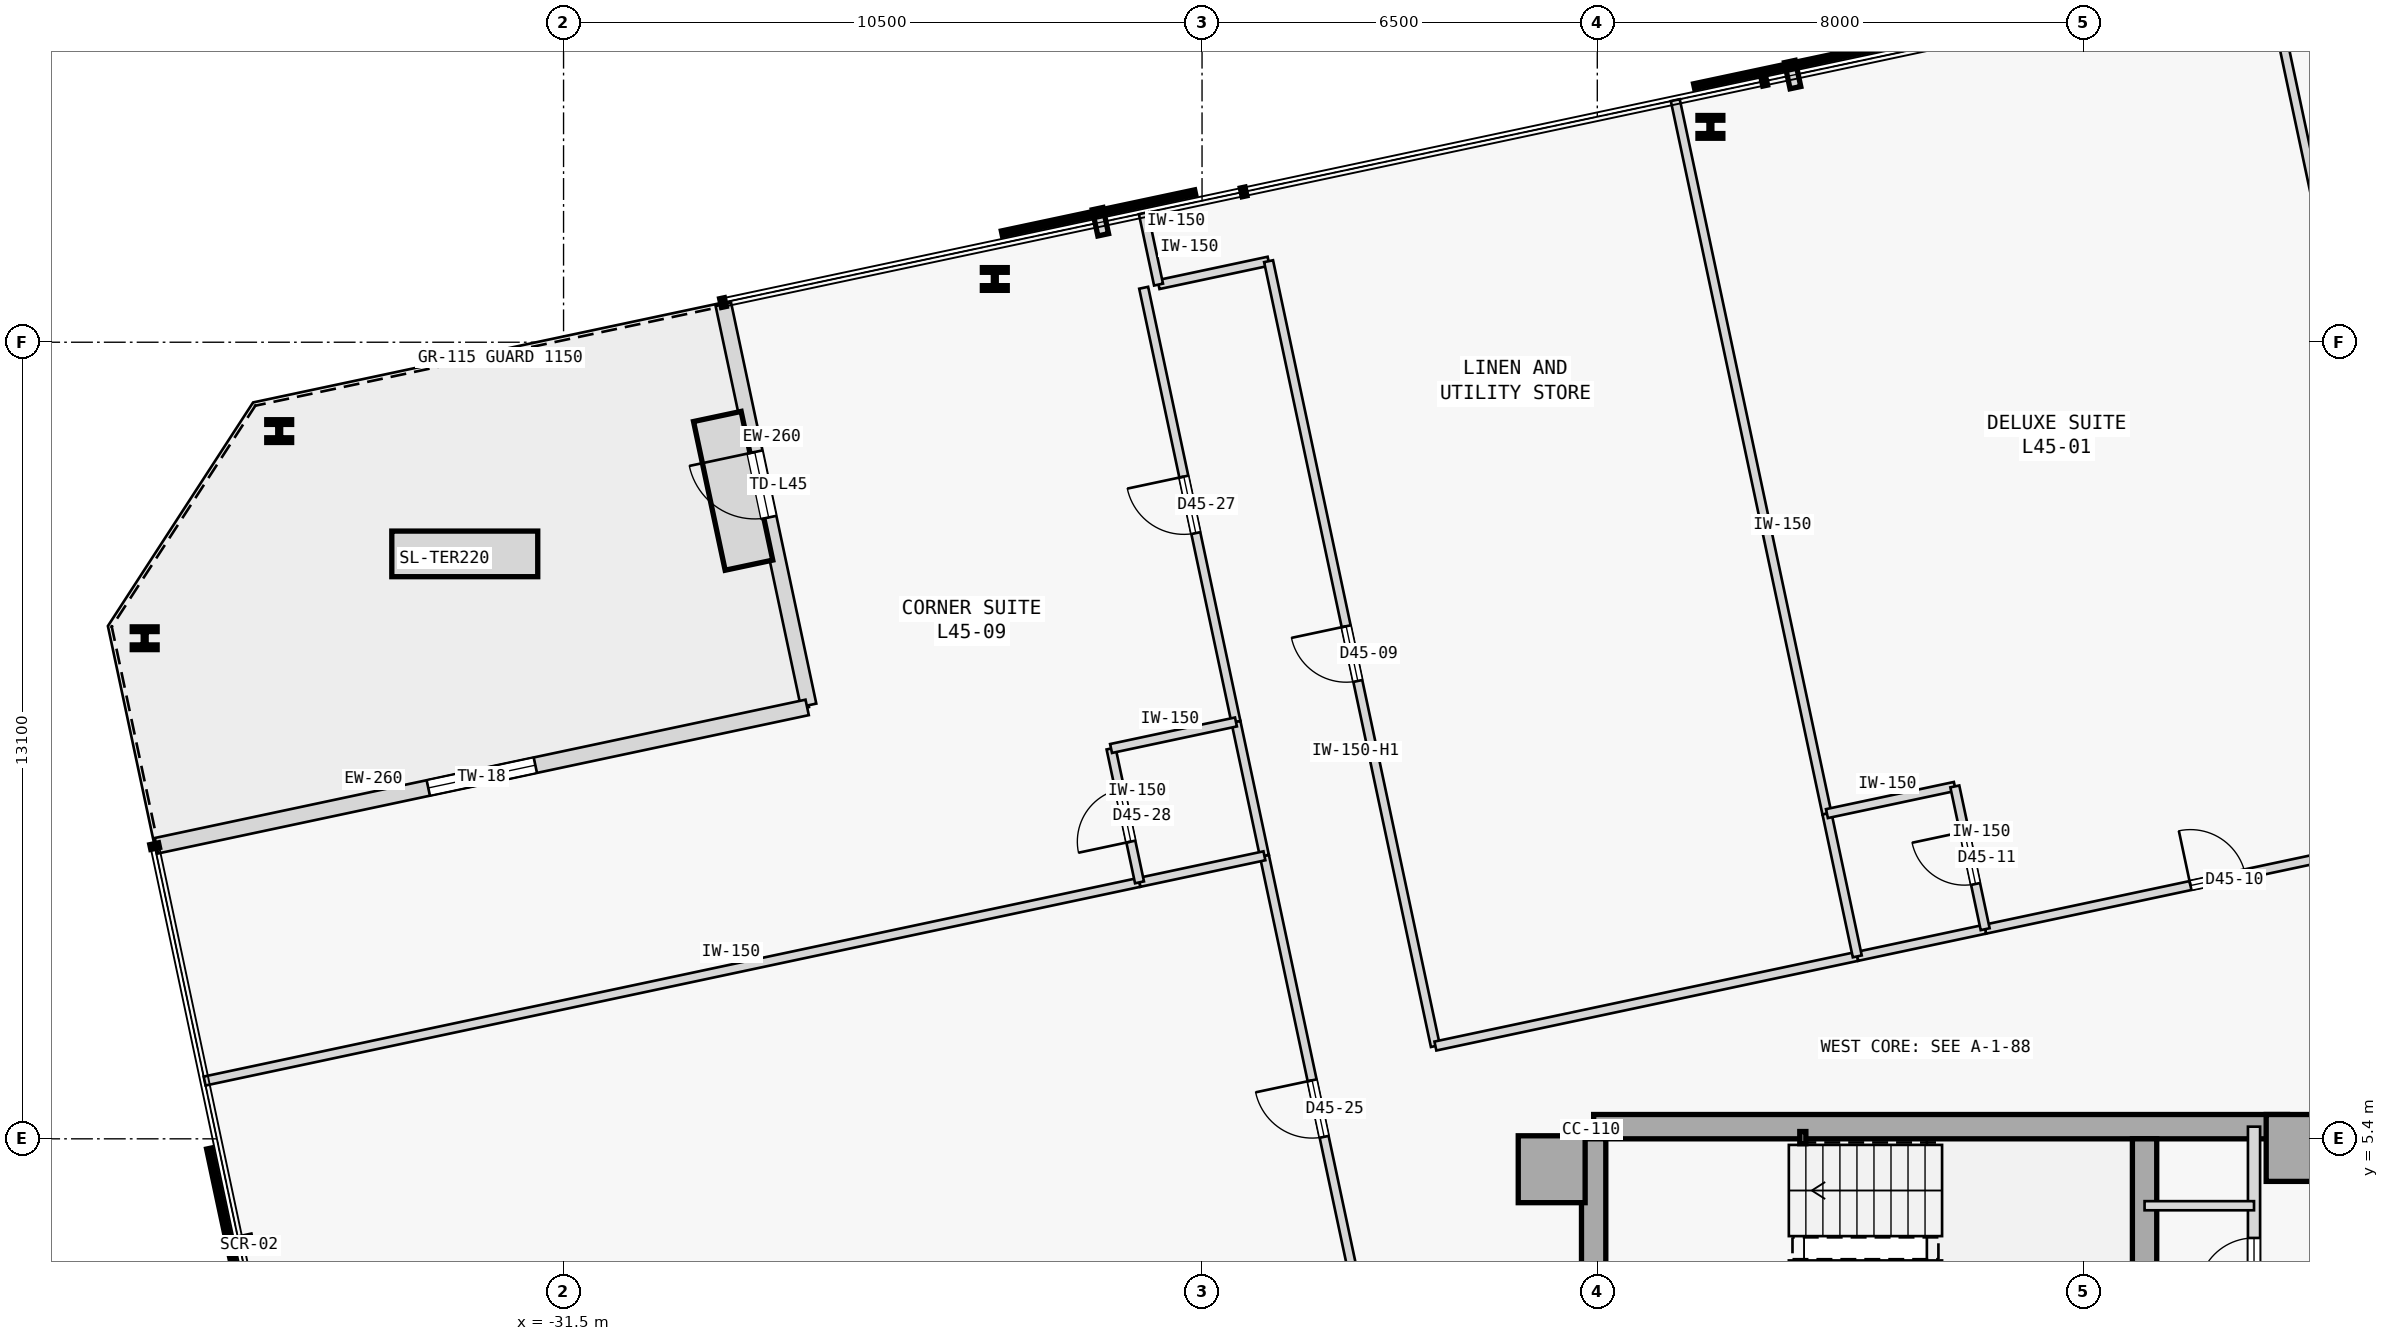
"""IFC4 building model, lengths in metres.
Left out: names, types, materials, properties, quantities, classifications, styles, units other than length and angle.
Written with IfcOpenShell. Run it as: python <this file> out.ifc"""

import sys

from ifc_helpers import new_model, si_unit, direction, frame, frame_2d, origin, origin_2d, place, context, subcontext, project, spatial, rectangle, hollow_rectangle, i_section, extrude, element, fill, save


model = new_model("IFC4")
c1 = context("Model", 3, precision=1e-05, world=origin(), true_north=direction((0.0, 1.0)))
c2 = subcontext(c1, "Body", "Model", "MODEL_VIEW")
j1 = project(units=[si_unit("LENGTHUNIT", "METRE"), si_unit("PLANEANGLEUNIT", "RADIAN")], contexts=[c1])
p1 = place(None, origin())
s1 = spatial("IfcSite", under=j1, at=p1, CompositionType="ELEMENT")
p2 = place(p1, origin())
s2 = spatial("IfcBuilding", under=s1, at=p2, CompositionType="ELEMENT")
p3 = place(p2, frame((0.0, 0.0, 175.2)))
s3 = spatial("IfcBuildingStorey", under=s2, at=p3, CompositionType="ELEMENT", Elevation=175.2)
for number, where, z_axis, x_axis in (
    (1, (-15.25, 4.9, 0.0), (0.0, 0.0, 1.0), (1.0, 0.0, 0.0)),
    (2, (-2.95, 5.25, 0.0), (0.0, 0.0, 1.0), (1.0, 0.0, 0.0)),
):
    element("IfcColumn", number, at=place(p3, frame(where, z_axis=z_axis, x_axis=x_axis)), inside=s3, PredefinedType="COLUMN", context=c2, shape_type="SweptSolid", body=[
        extrude(rectangle(XDim=1.1, YDim=1.1, at=origin_2d()), origin(), (0.0, 0.0, 1.0), 3.4),
    ])
p4 = place(p3, frame((-14.56, 5.6, 0.0), z_axis=(0.0, 0.0, 1.0), x_axis=(1.0, 0.0, 0.0)))
e3 = element("IfcWall", 3, at=p4, inside=s3, PredefinedType="SHEAR", context=c2, shape_type="SweptSolid", body=[
    extrude(rectangle(XDim=11.41, YDim=0.4, at=frame_2d((5.705, 0.0))), origin(), (0.0, 0.0, 1.0), 3.175),
])
p5 = place(p3, frame((-14.56, -5.4, 0.0), z_axis=(0.0, 0.0, 1.0), x_axis=(0.0, 1.0, 0.0)))
e4 = element("IfcWall", 4, at=p5, inside=s3, PredefinedType="SHEAR", context=c2, shape_type="SweptSolid", body=[
    extrude(rectangle(XDim=10.8, YDim=0.4, at=frame_2d((5.4, 0.0))), origin(), (0.0, 0.0, 1.0), 3.175),
])
p6 = place(p3, frame((-5.5, 2.15, 0.0), z_axis=(0.0, 0.0, 1.0), x_axis=(0.0, 1.0, 0.0)))
e5 = element("IfcWall", 5, at=p6, inside=s3, PredefinedType="SHEAR", context=c2, shape_type="SweptSolid", body=[
    extrude(rectangle(XDim=3.25, YDim=0.4, at=frame_2d((1.625, 0.0))), origin(), (0.0, 0.0, 1.0), 3.175),
])
p7 = place(p3, frame((-11.12, 5.42, 0.0), z_axis=(0.0, 0.0, 1.0), x_axis=(1.0, 0.0, 0.0)))
e6 = element("IfcColumn", 6, at=p7, inside=s3, PredefinedType="COLUMN", context=c2, shape_type="SweptSolid", body=[
    extrude(hollow_rectangle(XDim=0.1, YDim=0.2, WallThickness=0.008, at=origin_2d()), origin(), (0.0, 0.0, 1.0), 3.4),
])
for number, where, z_axis, x_axis in (
    (7, (-12.64, 22.042, 0.0), (0.0, 0.0, 1.0), (1.0, 0.0, 0.0)),
    (8, (-24.408, 19.54, 0.0), (0.0, 0.0, 1.0), (1.0, 0.0, 0.0)),
    (9, (-36.176, 17.039, 0.0), (0.0, 0.0, 1.0), (1.0, 0.0, 0.0)),
    (10, (-38.389, 13.632, 0.0), (0.0, 0.0, 1.0), (1.0, 0.0, 0.0)),
):
    element("IfcColumn", number, at=place(p3, frame(where, z_axis=z_axis, x_axis=x_axis)), inside=s3, PredefinedType="COLUMN", context=c2, shape_type="SweptSolid", body=[
        extrude(i_section(OverallWidth=0.409, OverallDepth=0.374, WebThickness=0.048, FlangeThickness=0.077, FilletRadius=0.015, at=origin_2d()), origin(), (0.0, 0.0, 1.0), 3.4),
    ])
p8 = place(p3, frame((-28.872, 19.123, 0.0), z_axis=(0.0, 0.0, 1.0), x_axis=(0.207950596046, -0.978139330364, 0.0)))
e11 = element("IfcWall", 11, at=p8, inside=s3, PredefinedType="STANDARD", context=c2, shape_type="SweptSolid", body=[
    extrude(rectangle(XDim=6.74, YDim=0.26, at=frame_2d((3.37, 0.0))), origin(), (0.0, 0.0, 1.0), 3.175),
])
p9 = place(p8, frame((2.483, 0.0, 0.0)))
e12 = element("IfcOpeningElement", 12, at=p9, cuts=e11, PredefinedType="OPENING", context=c2, shape_type="SweptSolid", body=[
    extrude(rectangle(XDim=1.1, YDim=2.2, at=frame_2d((0.55, 1.1))), frame((0.0, 0.14, 0.0), z_axis=(0.0, -1.0, 0.0), x_axis=(1.0, 0.0, 0.0)), (0.0, 0.0, 1.0), 0.28),
])
p10 = place(p3, frame((-27.494, 12.495, 0.0), z_axis=(0.0, 0.0, 1.0), x_axis=(-0.978145633983, -0.207920943438, 0.0)))
e13 = element("IfcWall", 13, at=p10, inside=s3, PredefinedType="STANDARD", context=c2, shape_type="SweptSolid", body=[
    extrude(rectangle(XDim=10.94, YDim=0.26, at=frame_2d((5.47, 0.0))), origin(), (0.0, 0.0, 1.0), 3.175),
])
p11 = place(p10, frame((4.57, 0.0, 0.8)))
e14 = element("IfcOpeningElement", 14, at=p11, cuts=e13, PredefinedType="OPENING", context=c2, shape_type="SweptSolid", body=[
    extrude(rectangle(XDim=1.8, YDim=1.8, at=frame_2d((0.9, 0.9))), frame((0.0, 0.14, 0.0), z_axis=(0.0, -1.0, 0.0), x_axis=(1.0, 0.0, 0.0)), (0.0, 0.0, 1.0), 0.28),
])
p12 = place(p3, frame((-3.7, -1.15, 0.0), z_axis=(0.0, 0.0, 1.0), x_axis=(0.0, 1.0, 0.0)))
e15 = element("IfcWall", 15, at=p12, inside=s3, PredefinedType="STANDARD", context=c2, shape_type="SweptSolid", body=[
    extrude(rectangle(XDim=6.75, YDim=0.2, at=frame_2d((3.375, 0.0))), origin(), (0.0, 0.0, 1.0), 3.175),
])
p13 = place(p12, frame((1.1, 0.0, 0.0)))
e16 = element("IfcOpeningElement", 16, at=p13, cuts=e15, PredefinedType="OPENING", context=c2, shape_type="SweptSolid", body=[
    extrude(rectangle(XDim=0.9, YDim=2.15, at=frame_2d((0.45, 1.075))), frame((0.0, 0.11, 0.0), z_axis=(0.0, -1.0, 0.0), x_axis=(1.0, 0.0, 0.0)), (0.0, 0.0, 1.0), 0.22),
])
p14 = place(p12, frame((4.0, 0.0, 0.0)))
e17 = element("IfcOpeningElement", 17, at=p14, cuts=e15, PredefinedType="OPENING", context=c2, shape_type="SweptSolid", body=[
    extrude(rectangle(XDim=0.92, YDim=2.15, at=frame_2d((0.46, 1.075))), frame((0.0, 0.11, 0.0), z_axis=(0.0, -1.0, 0.0), x_axis=(1.0, 0.0, 0.0)), (0.0, 0.0, 1.0), 0.22),
])
p15 = place(p3, frame((-5.5, 4.3, 0.0), z_axis=(0.0, 0.0, 1.0), x_axis=(1.0, 0.0, 0.0)))
e18 = element("IfcWall", 18, at=p15, inside=s3, PredefinedType="PARTITIONING", context=c2, shape_type="SweptSolid", body=[
    extrude(rectangle(XDim=1.8, YDim=0.15, at=frame_2d((0.9, 0.0))), origin(), (0.0, 0.0, 1.0), 3.175),
])
p16 = place(p3, frame((-21.715, 19.448, 0.0), z_axis=(0.0, 0.0, 1.0), x_axis=(0.978160192495, 0.207852442415, 0.0)))
e19 = element("IfcWall", 19, at=p16, inside=s3, PredefinedType="PARTITIONING", context=c2, shape_type="SweptSolid", body=[
    extrude(rectangle(XDim=1.85, YDim=0.15, at=frame_2d((0.925, 0.0))), origin(), (0.0, 0.0, 1.0), 3.175),
])
p17 = place(p3, frame((-17.162, 6.926, 0.0), z_axis=(0.0, 0.0, 1.0), x_axis=(-0.207911421929, 0.978147657888, 0.0)))
e20 = element("IfcWall", 20, at=p17, inside=s3, PredefinedType="PARTITIONING", context=c2, shape_type="SweptSolid", body=[
    extrude(rectangle(XDim=13.195, YDim=0.15, at=frame_2d((6.598, 0.0))), origin(), (0.0, 0.0, 1.0), 2.725),
])
p18 = place(p17, frame((6.137, 0.0, 0.0)))
e21 = element("IfcOpeningElement", 21, at=p18, cuts=e20, PredefinedType="OPENING", context=c2, shape_type="SweptSolid", body=[
    extrude(rectangle(XDim=0.92, YDim=2.15, at=frame_2d((0.46, 1.075))), frame((0.0, 0.085, 0.0), z_axis=(0.0, -1.0, 0.0), x_axis=(1.0, 0.0, 0.0)), (0.0, 0.0, 1.0), 0.17),
])
p19 = place(p3, frame((-17.162, 6.926, 0.0), z_axis=(0.0, 0.0, 1.0), x_axis=(0.978143627193, 0.207930383978, 0.0)))
e22 = element("IfcWall", 22, at=p19, inside=s3, PredefinedType="PARTITIONING", context=c2, shape_type="SweptSolid", body=[
    extrude(rectangle(XDim=7.093, YDim=0.15, at=frame_2d((3.546, 0.0))), origin(), (0.0, 0.0, 1.0), 3.175),
])
p20 = place(p3, frame((-8.121, 8.848, 0.0), z_axis=(0.0, 0.0, 1.0), x_axis=(0.978146318695, 0.207917722244, 0.0)))
e23 = element("IfcWall", 23, at=p20, inside=s3, PredefinedType="PARTITIONING", context=c2, shape_type="SweptSolid", body=[
    extrude(rectangle(XDim=7.824, YDim=0.15, at=frame_2d((3.912, 0.0))), origin(), (0.0, 0.0, 1.0), 3.175),
])
p21 = place(p20, frame((3.452, 0.0, 0.0)))
e24 = element("IfcOpeningElement", 24, at=p21, cuts=e23, PredefinedType="OPENING", context=c2, shape_type="SweptSolid", body=[
    extrude(rectangle(XDim=0.92, YDim=2.15, at=frame_2d((0.46, 1.075))), frame((0.0, 0.085, 0.0), z_axis=(0.0, -1.0, 0.0), x_axis=(1.0, 0.0, 0.0)), (0.0, 0.0, 1.0), 0.17),
])
p22 = place(p3, frame((-10.224, 8.401, 0.0), z_axis=(0.0, 0.0, 1.0), x_axis=(0.978146728319, 0.207915795165, 0.0)))
e25 = element("IfcWall", 25, at=p22, inside=s3, PredefinedType="PARTITIONING", context=c2, shape_type="SweptSolid", body=[
    extrude(rectangle(XDim=2.15, YDim=0.15, at=frame_2d((1.075, 0.0))), origin(), (0.0, 0.0, 1.0), 3.175),
])
p23 = place(p3, frame((-18.207, 1.74, 0.0), z_axis=(0.0, 0.0, 1.0), x_axis=(-0.207922306475, 0.978145344246, 0.0)))
e26 = element("IfcWall", 26, at=p23, inside=s3, PredefinedType="PARTITIONING", context=c2, shape_type="SweptSolid", body=[
    extrude(rectangle(XDim=8.5, YDim=0.15, at=frame_2d((4.25, 0.0))), origin(), (0.0, 0.0, 1.0), 3.175),
])
p24 = place(p23, frame((3.775, 0.0, 0.0)))
e27 = element("IfcOpeningElement", 27, at=p24, cuts=e26, PredefinedType="OPENING", context=c2, shape_type="SweptSolid", body=[
    extrude(rectangle(XDim=0.95, YDim=2.15, at=frame_2d((0.475, 1.075))), frame((0.0, 0.085, 0.0), z_axis=(0.0, -1.0, 0.0), x_axis=(1.0, 0.0, 0.0)), (0.0, 0.0, 1.0), 0.17),
])
p25 = place(p3, frame((-20.442, 12.255, 0.0), z_axis=(0.0, 0.0, 1.0), x_axis=(-0.207916352354, 0.978146609882, 0.0)))
e28 = element("IfcWall", 28, at=p25, inside=s3, PredefinedType="PARTITIONING", context=c2, shape_type="SweptSolid", body=[
    extrude(rectangle(XDim=7.3, YDim=0.15, at=frame_2d((3.65, 0.0))), origin(), (0.0, 0.0, 1.0), 3.175),
])
p26 = place(p25, frame((3.175, 0.0, 0.0)))
e29 = element("IfcOpeningElement", 29, at=p26, cuts=e28, PredefinedType="OPENING", context=c2, shape_type="SweptSolid", body=[
    extrude(rectangle(XDim=0.95, YDim=2.15, at=frame_2d((0.475, 1.075))), frame((0.0, 0.085, 0.0), z_axis=(0.0, -1.0, 0.0), x_axis=(1.0, 0.0, 0.0)), (0.0, 0.0, 1.0), 0.17),
])
p27 = place(p3, frame((-19.974, 10.055, 0.0), z_axis=(0.0, 0.0, 1.0), x_axis=(-0.207913264065, 0.978147266328, 0.0)))
e30 = element("IfcWall", 30, at=p27, inside=s3, PredefinedType="PARTITIONING", context=c2, shape_type="SweptSolid", body=[
    extrude(rectangle(XDim=2.25, YDim=0.15, at=frame_2d((1.125, 0.0))), origin(), (0.0, 0.0, 1.0), 3.175),
])
p28 = place(p3, frame((-10.723, 10.748, 0.0), z_axis=(0.0, 0.0, 1.0), x_axis=(-0.207914988081, 0.978146899873, 0.0)))
e31 = element("IfcWall", 31, at=p28, inside=s3, PredefinedType="PARTITIONING", context=c2, shape_type="SweptSolid", body=[
    extrude(rectangle(XDim=11.995, YDim=0.15, at=frame_2d((5.998, 0.0))), origin(), (0.0, 0.0, 1.0), 3.175),
])
p29 = place(p3, frame((-10.224, 8.401, 0.0), z_axis=(0.0, 0.0, 1.0), x_axis=(-0.207917150959, 0.978146440129, 0.0)))
e32 = element("IfcWall", 32, at=p29, inside=s3, PredefinedType="PARTITIONING", context=c2, shape_type="SweptSolid", body=[
    extrude(rectangle(XDim=2.4, YDim=0.15, at=frame_2d((1.2, 0.0))), origin(), (0.0, 0.0, 1.0), 3.175),
])
p30 = place(p3, frame((-21.715, 19.448, 0.0), z_axis=(0.0, 0.0, 1.0), x_axis=(-0.20795853359, 0.978137642823, 0.0)))
e33 = element("IfcWall", 33, at=p30, inside=s3, PredefinedType="PARTITIONING", context=c2, shape_type="SweptSolid", body=[
    extrude(rectangle(XDim=1.2, YDim=0.15, at=frame_2d((0.6, 0.0))), origin(), (0.0, 0.0, 1.0), 3.175),
])
p31 = place(p3, frame((-10.723, 10.748, 0.0), z_axis=(0.0, 0.0, 1.0), x_axis=(0.978146728319, 0.207915795165, 0.0)))
e34 = element("IfcWall", 34, at=p31, inside=s3, PredefinedType="PARTITIONING", context=c2, shape_type="SweptSolid", body=[
    extrude(rectangle(XDim=2.15, YDim=0.15, at=frame_2d((1.075, 0.0))), origin(), (0.0, 0.0, 1.0), 3.175),
])
p32 = place(p3, frame((-8.121, 8.848, 0.0), z_axis=(0.0, 0.0, 1.0), x_axis=(-0.207917150959, 0.978146440129, 0.0)))
e35 = element("IfcWall", 35, at=p32, inside=s3, PredefinedType="PARTITIONING", context=c2, shape_type="SweptSolid", body=[
    extrude(rectangle(XDim=2.4, YDim=0.15, at=frame_2d((1.2, 0.0))), origin(), (0.0, 0.0, 1.0), 3.175),
])
p33 = place(p32, frame((0.76, 0.0, 0.0)))
e36 = element("IfcOpeningElement", 36, at=p33, cuts=e35, PredefinedType="OPENING", context=c2, shape_type="SweptSolid", body=[
    extrude(rectangle(XDim=0.88, YDim=2.15, at=frame_2d((0.44, 1.075))), frame((0.0, 0.085, 0.0), z_axis=(0.0, -1.0, 0.0), x_axis=(1.0, 0.0, 0.0)), (0.0, 0.0, 1.0), 0.17),
])
p34 = place(p3, frame((-0.967, 12.822, 0.0), z_axis=(0.0, 0.0, 1.0), x_axis=(-0.207914988081, 0.978146899873, 0.0)))
e37 = element("IfcWall", 37, at=p34, inside=s3, PredefinedType="PARTITIONING", context=c2, shape_type="SweptSolid", body=[
    extrude(rectangle(XDim=11.995, YDim=0.15, at=frame_2d((5.998, 0.0))), origin(), (0.0, 0.0, 1.0), 3.175),
])
p35 = place(p3, frame((-37.403, 6.35, 0.0), z_axis=(0.0, 0.0, 1.0), x_axis=(0.978149296727, 0.207903711638, 0.0)))
e38 = element("IfcWall", 38, at=p35, inside=s3, PredefinedType="PARTITIONING", context=c2, shape_type="SweptSolid", body=[
    extrude(rectangle(XDim=15.718, YDim=0.15, at=frame_2d((7.859, 0.0))), origin(), (0.0, 0.0, 1.0), 3.175),
])
p36 = place(p3, frame((-22.029, 9.618, 0.0), z_axis=(0.0, 0.0, 1.0), x_axis=(0.978134617382, 0.207972763311, 0.0)))
e39 = element("IfcWall", 39, at=p36, inside=s3, PredefinedType="PARTITIONING", context=c2, shape_type="SweptSolid", body=[
    extrude(rectangle(XDim=2.1, YDim=0.15, at=frame_2d((1.05, 0.0))), origin(), (0.0, 0.0, 1.0), 3.175),
])
p37 = place(p3, frame((-22.029, 9.618, 0.0), z_axis=(0.0, 0.0, 1.0), x_axis=(-0.207891197838, 0.978151956427, 0.0)))
e40 = element("IfcWall", 40, at=p37, inside=s3, PredefinedType="PARTITIONING", context=c2, shape_type="SweptSolid", body=[
    extrude(rectangle(XDim=2.25, YDim=0.15, at=frame_2d((1.125, 0.0))), origin(), (0.0, 0.0, 1.0), 3.175),
])
p38 = place(p37, frame((0.685, 0.0, 0.0)))
e41 = element("IfcOpeningElement", 41, at=p38, cuts=e40, PredefinedType="OPENING", context=c2, shape_type="SweptSolid", body=[
    extrude(rectangle(XDim=0.88, YDim=2.15, at=frame_2d((0.44, 1.075))), frame((0.0, 0.085, 0.0), z_axis=(0.0, -1.0, 0.0), x_axis=(1.0, 0.0, 0.0)), (0.0, 0.0, 1.0), 0.17),
])
p39 = place(p3, frame((-22.496, 11.819, 0.0), z_axis=(0.0, 0.0, 1.0), x_axis=(0.97815826, 0.207861536591, 0.0)))
e42 = element("IfcWall", 42, at=p39, inside=s3, PredefinedType="PARTITIONING", context=c2, shape_type="SweptSolid", body=[
    extrude(rectangle(XDim=2.1, YDim=0.15, at=frame_2d((1.05, 0.0))), origin(), (0.0, 0.0, 1.0), 3.175),
])
p40 = place(p9, frame((1.1, 0.0, 0.0), z_axis=(0.0, 0.0, 1.0), x_axis=(-1.0, 0.0, 0.0)))
e43 = element("IfcDoor", 43, at=p40, inside=s3, OperationType="SINGLE_SWING_LEFT", PredefinedType="DOOR", context=c2, shape_type="SweptSolid", body=[
    extrude(rectangle(XDim=1.1, YDim=2.2, at=frame_2d((0.55, 1.1))), frame((0.0, 0.025, 0.0), z_axis=(0.0, -1.0, 0.0), x_axis=(1.0, 0.0, 0.0)), (0.0, 0.0, 1.0), 0.05),
])
fill(e12, e43)
p41 = place(p11, origin())
e44 = element("IfcWindow", 44, at=p41, inside=s3, PartitioningType="SINGLE_PANEL", PredefinedType="WINDOW", context=c2, shape_type="SweptSolid", body=[
    extrude(rectangle(XDim=1.8, YDim=1.8, at=frame_2d((0.9, 0.9))), frame((0.0, 0.03, 0.0), z_axis=(0.0, -1.0, 0.0), x_axis=(1.0, 0.0, 0.0)), (0.0, 0.0, 1.0), 0.06),
])
fill(e14, e44)
p42 = place(p14, origin())
e45 = element("IfcDoor", 45, at=p42, inside=s3, OperationType="SINGLE_SWING_LEFT", PredefinedType="DOOR", context=c2, shape_type="SweptSolid", body=[
    extrude(rectangle(XDim=0.92, YDim=2.15, at=frame_2d((0.46, 1.075))), frame((0.0, 0.025, 0.0), z_axis=(0.0, -1.0, 0.0), x_axis=(1.0, 0.0, 0.0)), (0.0, 0.0, 1.0), 0.05),
])
fill(e17, e45)
p43 = place(p18, origin())
e46 = element("IfcDoor", 46, at=p43, inside=s3, OperationType="SINGLE_SWING_RIGHT", PredefinedType="DOOR", context=c2, shape_type="SweptSolid", body=[
    extrude(rectangle(XDim=0.92, YDim=2.15, at=frame_2d((0.46, 1.075))), frame((0.0, 0.025, 0.0), z_axis=(0.0, -1.0, 0.0), x_axis=(1.0, 0.0, 0.0)), (0.0, 0.0, 1.0), 0.05),
])
fill(e21, e46)
p44 = place(p21, origin())
e47 = element("IfcDoor", 47, at=p44, inside=s3, OperationType="SINGLE_SWING_LEFT", PredefinedType="DOOR", context=c2, shape_type="SweptSolid", body=[
    extrude(rectangle(XDim=0.92, YDim=2.15, at=frame_2d((0.46, 1.075))), frame((0.0, 0.025, 0.0), z_axis=(0.0, -1.0, 0.0), x_axis=(1.0, 0.0, 0.0)), (0.0, 0.0, 1.0), 0.05),
])
fill(e24, e47)
p45 = place(p33, origin())
e48 = element("IfcDoor", 48, at=p45, inside=s3, OperationType="SINGLE_SWING_RIGHT", PredefinedType="DOOR", context=c2, shape_type="SweptSolid", body=[
    extrude(rectangle(XDim=0.88, YDim=2.15, at=frame_2d((0.44, 1.075))), frame((0.0, 0.025, 0.0), z_axis=(0.0, -1.0, 0.0), x_axis=(1.0, 0.0, 0.0)), (0.0, 0.0, 1.0), 0.05),
])
fill(e36, e48)
p46 = place(p24, origin())
e49 = element("IfcDoor", 49, at=p46, inside=s3, OperationType="SINGLE_SWING_RIGHT", PredefinedType="DOOR", context=c2, shape_type="SweptSolid", body=[
    extrude(rectangle(XDim=0.95, YDim=2.15, at=frame_2d((0.475, 1.075))), frame((0.0, 0.025, 0.0), z_axis=(0.0, -1.0, 0.0), x_axis=(1.0, 0.0, 0.0)), (0.0, 0.0, 1.0), 0.05),
])
fill(e27, e49)
p47 = place(p26, origin())
e50 = element("IfcDoor", 50, at=p47, inside=s3, OperationType="SINGLE_SWING_RIGHT", PredefinedType="DOOR", context=c2, shape_type="SweptSolid", body=[
    extrude(rectangle(XDim=0.95, YDim=2.15, at=frame_2d((0.475, 1.075))), frame((0.0, 0.025, 0.0), z_axis=(0.0, -1.0, 0.0), x_axis=(1.0, 0.0, 0.0)), (0.0, 0.0, 1.0), 0.05),
])
fill(e29, e50)
p48 = place(p38, origin())
e51 = element("IfcDoor", 51, at=p48, inside=s3, OperationType="SINGLE_SWING_LEFT", PredefinedType="DOOR", context=c2, shape_type="SweptSolid", body=[
    extrude(rectangle(XDim=0.88, YDim=2.15, at=frame_2d((0.44, 1.075))), frame((0.0, 0.025, 0.0), z_axis=(0.0, -1.0, 0.0), x_axis=(1.0, 0.0, 0.0)), (0.0, 0.0, 1.0), 0.05),
])
fill(e41, e51)
save(model, sys.argv[1])
